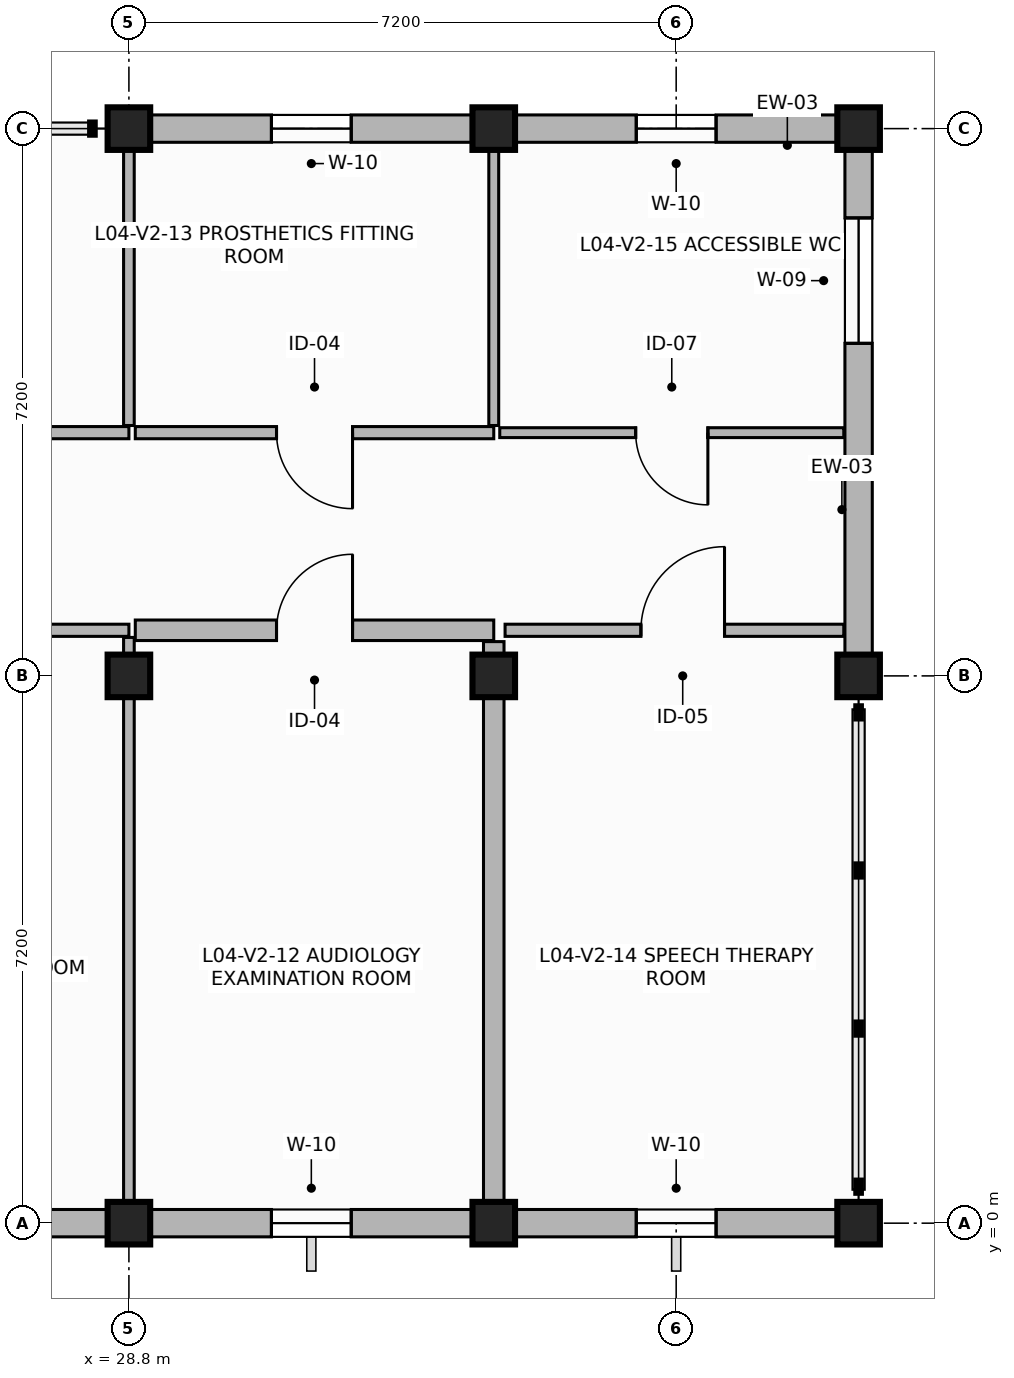
"""IFC4 building model, lengths in metres.
Left out: names, types, materials, properties, quantities, classifications, styles, units other than length and angle.
Written with IfcOpenShell. Run it as: python <this file> out.ifc"""

import sys

from ifc_helpers import new_model, si_unit, direction, frame, frame_2d, origin, origin_2d, place, context, subcontext, project, spatial, rectangle, extrude, element, fill, save


model = new_model("IFC4")
c1 = context("Model", 3, precision=1e-05, world=origin(), true_north=direction((0.0, 1.0)))
c2 = subcontext(c1, "Body", "Model", "MODEL_VIEW")
j1 = project(units=[si_unit("LENGTHUNIT", "METRE"), si_unit("PLANEANGLEUNIT", "RADIAN")], contexts=[c1])
p1 = place(None, origin())
s1 = spatial("IfcSite", under=j1, at=p1, CompositionType="ELEMENT")
p2 = place(p1, origin())
s2 = spatial("IfcBuilding", under=s1, at=p2, CompositionType="ELEMENT")
p3 = place(p2, frame((0.0, 0.0, 16.0)))
s3 = spatial("IfcBuildingStorey", under=s2, at=p3, CompositionType="ELEMENT", Elevation=16.0)
for number, where, z_axis, x_axis in (
    (1, (28.8, 0.0, 0.0), (0.0, 0.0, 1.0), (1.0, 0.0, 0.0)),
    (2, (28.8, 7.2, 0.0), (0.0, 0.0, 1.0), (1.0, 0.0, 0.0)),
    (3, (28.8, 14.4, 0.0), (0.0, 0.0, 1.0), (1.0, 0.0, 0.0)),
    (4, (33.6, 0.0, 0.0), (0.0, 0.0, 1.0), (1.0, 0.0, 0.0)),
    (5, (33.6, 7.2, 0.0), (0.0, 0.0, 1.0), (1.0, 0.0, 0.0)),
    (6, (33.6, 14.4, 0.0), (0.0, 0.0, 1.0), (1.0, 0.0, 0.0)),
    (7, (38.4, 0.0, 0.0), (0.0, 0.0, 1.0), (1.0, 0.0, 0.0)),
    (8, (38.4, 7.2, 0.0), (0.0, 0.0, 1.0), (1.0, 0.0, 0.0)),
    (9, (38.4, 14.4, 0.0), (0.0, 0.0, 1.0), (1.0, 0.0, 0.0)),
):
    element("IfcColumn", number, at=place(p3, frame(where, z_axis=z_axis, x_axis=x_axis)), inside=s3, PredefinedType="COLUMN", context=c2, shape_type="SweptSolid", body=[
        extrude(rectangle(XDim=0.56, YDim=0.56, at=origin_2d()), origin(), (0.0, 0.0, 1.0), 3.42),
    ])
p4 = place(p3, frame((21.6, 0.0, 0.0), z_axis=(0.0, 0.0, 1.0), x_axis=(1.0, 0.0, 0.0)))
e10 = element("IfcWall", 10, at=p4, inside=s3, PredefinedType="SOLIDWALL", context=c2, shape_type="SweptSolid", body=[
    extrude(rectangle(XDim=7.2, YDim=0.36, at=frame_2d((3.6, 0.0))), origin(), (0.0, 0.0, 1.0), 2.8),
])
p5 = place(p4, frame((2.875, 0.0, 0.85)))
e11 = element("IfcOpeningElement", 11, at=p5, cuts=e10, PredefinedType="OPENING", context=c2, shape_type="SweptSolid", body=[
    extrude(rectangle(XDim=1.45, YDim=1.75, at=frame_2d((0.725, 0.875))), frame((0.0, 0.19, 0.0), z_axis=(0.0, -1.0, 0.0), x_axis=(1.0, 0.0, 0.0)), (0.0, 0.0, 1.0), 0.38),
])
p6 = place(p3, frame((28.8, 0.0, 0.0), z_axis=(0.0, 0.0, 1.0), x_axis=(1.0, 0.0, 0.0)))
e12 = element("IfcWall", 12, at=p6, inside=s3, PredefinedType="SOLIDWALL", context=c2, shape_type="SweptSolid", body=[
    extrude(rectangle(XDim=4.8, YDim=0.36, at=frame_2d((2.4, 0.0))), origin(), (0.0, 0.0, 1.0), 2.8),
])
p7 = place(p6, frame((1.875, 0.0, 0.85)))
e13 = element("IfcOpeningElement", 13, at=p7, cuts=e12, PredefinedType="OPENING", context=c2, shape_type="SweptSolid", body=[
    extrude(rectangle(XDim=1.05, YDim=1.7, at=frame_2d((0.525, 0.85))), frame((0.0, 0.19, 0.0), z_axis=(0.0, -1.0, 0.0), x_axis=(1.0, 0.0, 0.0)), (0.0, 0.0, 1.0), 0.38),
])
p8 = place(p3, frame((33.6, 0.0, 0.0), z_axis=(0.0, 0.0, 1.0), x_axis=(1.0, 0.0, 0.0)))
e14 = element("IfcWall", 14, at=p8, inside=s3, PredefinedType="SOLIDWALL", context=c2, shape_type="SweptSolid", body=[
    extrude(rectangle(XDim=4.8, YDim=0.36, at=frame_2d((2.4, 0.0))), origin(), (0.0, 0.0, 1.0), 2.8),
])
p9 = place(p8, frame((1.875, 0.0, 0.85)))
e15 = element("IfcOpeningElement", 15, at=p9, cuts=e14, PredefinedType="OPENING", context=c2, shape_type="SweptSolid", body=[
    extrude(rectangle(XDim=1.05, YDim=1.7, at=frame_2d((0.525, 0.85))), frame((0.0, 0.19, 0.0), z_axis=(0.0, -1.0, 0.0), x_axis=(1.0, 0.0, 0.0)), (0.0, 0.0, 1.0), 0.38),
])
p10 = place(p3, frame((38.4, 7.2, 0.0), z_axis=(0.0, 0.0, 1.0), x_axis=(0.0, 1.0, 0.0)))
e16 = element("IfcWall", 16, at=p10, inside=s3, PredefinedType="SOLIDWALL", context=c2, shape_type="SweptSolid", body=[
    extrude(rectangle(XDim=7.2, YDim=0.36, at=frame_2d((3.6, 0.0))), origin(), (0.0, 0.0, 1.0), 2.8),
])
p11 = place(p10, frame((4.375, 0.0, 0.85)))
e17 = element("IfcOpeningElement", 17, at=p11, cuts=e16, PredefinedType="OPENING", context=c2, shape_type="SweptSolid", body=[
    extrude(rectangle(XDim=1.65, YDim=1.75, at=frame_2d((0.825, 0.875))), frame((0.0, 0.19, 0.0), z_axis=(0.0, -1.0, 0.0), x_axis=(1.0, 0.0, 0.0)), (0.0, 0.0, 1.0), 0.38),
])
p12 = place(p3, frame((38.4, 14.4, 0.0), z_axis=(0.0, 0.0, 1.0), x_axis=(-1.0, 0.0, 0.0)))
e18 = element("IfcWall", 18, at=p12, inside=s3, PredefinedType="SOLIDWALL", context=c2, shape_type="SweptSolid", body=[
    extrude(rectangle(XDim=4.8, YDim=0.36, at=frame_2d((2.4, 0.0))), origin(), (0.0, 0.0, 1.0), 2.8),
])
p13 = place(p12, frame((1.875, 0.0, 0.85)))
e19 = element("IfcOpeningElement", 19, at=p13, cuts=e18, PredefinedType="OPENING", context=c2, shape_type="SweptSolid", body=[
    extrude(rectangle(XDim=1.05, YDim=1.7, at=frame_2d((0.525, 0.85))), frame((0.0, 0.19, 0.0), z_axis=(0.0, -1.0, 0.0), x_axis=(1.0, 0.0, 0.0)), (0.0, 0.0, 1.0), 0.38),
])
p14 = place(p3, frame((33.6, 14.4, 0.0), z_axis=(0.0, 0.0, 1.0), x_axis=(-1.0, 0.0, 0.0)))
e20 = element("IfcWall", 20, at=p14, inside=s3, PredefinedType="SOLIDWALL", context=c2, shape_type="SweptSolid", body=[
    extrude(rectangle(XDim=4.8, YDim=0.36, at=frame_2d((2.4, 0.0))), origin(), (0.0, 0.0, 1.0), 2.8),
])
p15 = place(p14, frame((1.875, 0.0, 0.85)))
e21 = element("IfcOpeningElement", 21, at=p15, cuts=e20, PredefinedType="OPENING", context=c2, shape_type="SweptSolid", body=[
    extrude(rectangle(XDim=1.05, YDim=1.7, at=frame_2d((0.525, 0.85))), frame((0.0, 0.19, 0.0), z_axis=(0.0, -1.0, 0.0), x_axis=(1.0, 0.0, 0.0)), (0.0, 0.0, 1.0), 0.38),
])
p16 = place(p3, frame((21.684, 7.8, 0.0), z_axis=(0.0, 0.0, 1.0), x_axis=(1.0, 0.0, 0.0)))
e22 = element("IfcWall", 22, at=p16, inside=s3, PredefinedType="PARTITIONING", context=c2, shape_type="SweptSolid", body=[
    extrude(rectangle(XDim=7.116, YDim=0.16, at=frame_2d((3.558, 0.0))), origin(), (0.0, 0.0, 1.0), 2.78),
])
p17 = place(p16, frame((3.008, 0.0, 0.0)))
e23 = element("IfcOpeningElement", 23, at=p17, cuts=e22, PredefinedType="OPENING", context=c2, shape_type="SweptSolid", body=[
    extrude(rectangle(XDim=1.1, YDim=2.2, at=frame_2d((0.55, 1.1))), frame((0.0, 0.09, 0.0), z_axis=(0.0, -1.0, 0.0), x_axis=(1.0, 0.0, 0.0)), (0.0, 0.0, 1.0), 0.18),
])
p18 = place(p3, frame((28.8, 7.706, 0.0), z_axis=(0.0, 0.0, 1.0), x_axis=(0.0, -1.0, 0.0)))
e24 = element("IfcWall", 24, at=p18, inside=s3, PredefinedType="PARTITIONING", context=c2, shape_type="SweptSolid", body=[
    extrude(rectangle(XDim=7.511, YDim=0.14, at=frame_2d((3.755, 0.0))), origin(), (0.0, 0.0, 1.0), 2.78),
])
p19 = place(p3, frame((28.8, 10.4, 0.0), z_axis=(0.0, 0.0, 1.0), x_axis=(-1.0, 0.0, 0.0)))
e25 = element("IfcWall", 25, at=p19, inside=s3, PredefinedType="PARTITIONING", context=c2, shape_type="SweptSolid", body=[
    extrude(rectangle(XDim=7.116, YDim=0.16, at=frame_2d((3.558, 0.0))), origin(), (0.0, 0.0, 1.0), 2.78),
])
p20 = place(p19, frame((3.033, 0.0, 0.0)))
e26 = element("IfcOpeningElement", 26, at=p20, cuts=e25, PredefinedType="OPENING", context=c2, shape_type="SweptSolid", body=[
    extrude(rectangle(XDim=1.05, YDim=2.15, at=frame_2d((0.525, 1.075))), frame((0.0, 0.09, 0.0), z_axis=(0.0, -1.0, 0.0), x_axis=(1.0, 0.0, 0.0)), (0.0, 0.0, 1.0), 0.18),
])
p21 = place(p3, frame((28.8, 14.205, 0.0), z_axis=(0.0, 0.0, 1.0), x_axis=(0.0, -1.0, 0.0)))
e27 = element("IfcWall", 27, at=p21, inside=s3, PredefinedType="PARTITIONING", context=c2, shape_type="SweptSolid", body=[
    extrude(rectangle(XDim=3.711, YDim=0.14, at=frame_2d((1.855, 0.0))), origin(), (0.0, 0.0, 1.0), 2.78),
])
p22 = place(p3, frame((28.884, 7.8, 0.0), z_axis=(0.0, 0.0, 1.0), x_axis=(1.0, 0.0, 0.0)))
e28 = element("IfcWall", 28, at=p22, inside=s3, PredefinedType="PARTITIONING", context=c2, shape_type="SweptSolid", body=[
    extrude(rectangle(XDim=4.716, YDim=0.27, at=frame_2d((2.358, 0.0))), origin(), (0.0, 0.0, 1.0), 2.78),
])
p23 = place(p22, frame((1.858, 0.0, 0.0)))
e29 = element("IfcOpeningElement", 29, at=p23, cuts=e28, PredefinedType="OPENING", context=c2, shape_type="SweptSolid", body=[
    extrude(rectangle(XDim=1.0, YDim=2.15, at=frame_2d((0.5, 1.075))), frame((0.0, 0.145, 0.0), z_axis=(0.0, -1.0, 0.0), x_axis=(1.0, 0.0, 0.0)), (0.0, 0.0, 1.0), 0.29),
])
p24 = place(p3, frame((33.6, 7.651, 0.0), z_axis=(0.0, 0.0, 1.0), x_axis=(0.0, -1.0, 0.0)))
e30 = element("IfcWall", 30, at=p24, inside=s3, PredefinedType="PARTITIONING", context=c2, shape_type="SweptSolid", body=[
    extrude(rectangle(XDim=7.456, YDim=0.27, at=frame_2d((3.728, 0.0))), origin(), (0.0, 0.0, 1.0), 2.78),
])
p25 = place(p3, frame((33.6, 10.4, 0.0), z_axis=(0.0, 0.0, 1.0), x_axis=(-1.0, 0.0, 0.0)))
e31 = element("IfcWall", 31, at=p25, inside=s3, PredefinedType="PARTITIONING", context=c2, shape_type="SweptSolid", body=[
    extrude(rectangle(XDim=4.716, YDim=0.16, at=frame_2d((2.358, 0.0))), origin(), (0.0, 0.0, 1.0), 2.78),
])
p26 = place(p25, frame((1.858, 0.0, 0.0)))
e32 = element("IfcOpeningElement", 32, at=p26, cuts=e31, PredefinedType="OPENING", context=c2, shape_type="SweptSolid", body=[
    extrude(rectangle(XDim=1.0, YDim=2.15, at=frame_2d((0.5, 1.075))), frame((0.0, 0.09, 0.0), z_axis=(0.0, -1.0, 0.0), x_axis=(1.0, 0.0, 0.0)), (0.0, 0.0, 1.0), 0.18),
])
p27 = place(p3, frame((33.6, 14.205, 0.0), z_axis=(0.0, 0.0, 1.0), x_axis=(0.0, -1.0, 0.0)))
e33 = element("IfcWall", 33, at=p27, inside=s3, PredefinedType="PARTITIONING", context=c2, shape_type="SweptSolid", body=[
    extrude(rectangle(XDim=3.711, YDim=0.13, at=frame_2d((1.855, 0.0))), origin(), (0.0, 0.0, 1.0), 2.78),
])
p28 = place(p3, frame((33.749, 7.8, 0.0), z_axis=(0.0, 0.0, 1.0), x_axis=(1.0, 0.0, 0.0)))
e34 = element("IfcWall", 34, at=p28, inside=s3, PredefinedType="PARTITIONING", context=c2, shape_type="SweptSolid", body=[
    extrude(rectangle(XDim=4.456, YDim=0.16, at=frame_2d((2.228, 0.0))), origin(), (0.0, 0.0, 1.0), 2.78),
])
p29 = place(p28, frame((1.787, 0.0, 0.0)))
e35 = element("IfcOpeningElement", 35, at=p29, cuts=e34, PredefinedType="OPENING", context=c2, shape_type="SweptSolid", body=[
    extrude(rectangle(XDim=1.1, YDim=2.2, at=frame_2d((0.55, 1.1))), frame((0.0, 0.09, 0.0), z_axis=(0.0, -1.0, 0.0), x_axis=(1.0, 0.0, 0.0)), (0.0, 0.0, 1.0), 0.18),
])
p30 = place(p3, frame((38.205, 10.4, 0.0), z_axis=(0.0, 0.0, 1.0), x_axis=(-1.0, 0.0, 0.0)))
e36 = element("IfcWall", 36, at=p30, inside=s3, PredefinedType="PARTITIONING", context=c2, shape_type="SweptSolid", body=[
    extrude(rectangle(XDim=4.526, YDim=0.13, at=frame_2d((2.263, 0.0))), origin(), (0.0, 0.0, 1.0), 2.78),
])
p31 = place(p30, frame((1.788, 0.0, 0.0)))
e37 = element("IfcOpeningElement", 37, at=p31, cuts=e36, PredefinedType="OPENING", context=c2, shape_type="SweptSolid", body=[
    extrude(rectangle(XDim=0.95, YDim=2.1, at=frame_2d((0.475, 1.05))), frame((0.0, 0.075, 0.0), z_axis=(0.0, -1.0, 0.0), x_axis=(1.0, 0.0, 0.0)), (0.0, 0.0, 1.0), 0.15),
])
p32 = place(p7, origin())
e38 = element("IfcWindow", 38, at=p32, inside=s3, PartitioningType="SINGLE_PANEL", PredefinedType="WINDOW", context=c2, shape_type="SweptSolid", body=[
    extrude(rectangle(XDim=1.05, YDim=1.7, at=frame_2d((0.525, 0.85))), frame((0.0, 0.03, 0.0), z_axis=(0.0, -1.0, 0.0), x_axis=(1.0, 0.0, 0.0)), (0.0, 0.0, 1.0), 0.06),
])
fill(e13, e38)
p33 = place(p9, origin())
e39 = element("IfcWindow", 39, at=p33, inside=s3, PartitioningType="SINGLE_PANEL", PredefinedType="WINDOW", context=c2, shape_type="SweptSolid", body=[
    extrude(rectangle(XDim=1.05, YDim=1.7, at=frame_2d((0.525, 0.85))), frame((0.0, 0.03, 0.0), z_axis=(0.0, -1.0, 0.0), x_axis=(1.0, 0.0, 0.0)), (0.0, 0.0, 1.0), 0.06),
])
fill(e15, e39)
p34 = place(p11, origin())
e40 = element("IfcWindow", 40, at=p34, inside=s3, PartitioningType="SINGLE_PANEL", PredefinedType="WINDOW", context=c2, shape_type="SweptSolid", body=[
    extrude(rectangle(XDim=1.65, YDim=1.75, at=frame_2d((0.825, 0.875))), frame((0.0, 0.03, 0.0), z_axis=(0.0, -1.0, 0.0), x_axis=(1.0, 0.0, 0.0)), (0.0, 0.0, 1.0), 0.06),
])
fill(e17, e40)
p35 = place(p13, origin())
e41 = element("IfcWindow", 41, at=p35, inside=s3, PartitioningType="SINGLE_PANEL", PredefinedType="WINDOW", context=c2, shape_type="SweptSolid", body=[
    extrude(rectangle(XDim=1.05, YDim=1.7, at=frame_2d((0.525, 0.85))), frame((0.0, 0.03, 0.0), z_axis=(0.0, -1.0, 0.0), x_axis=(1.0, 0.0, 0.0)), (0.0, 0.0, 1.0), 0.06),
])
fill(e19, e41)
p36 = place(p15, origin())
e42 = element("IfcWindow", 42, at=p36, inside=s3, PartitioningType="SINGLE_PANEL", PredefinedType="WINDOW", context=c2, shape_type="SweptSolid", body=[
    extrude(rectangle(XDim=1.05, YDim=1.7, at=frame_2d((0.525, 0.85))), frame((0.0, 0.03, 0.0), z_axis=(0.0, -1.0, 0.0), x_axis=(1.0, 0.0, 0.0)), (0.0, 0.0, 1.0), 0.06),
])
fill(e21, e42)
p37 = place(p23, origin())
e43 = element("IfcDoor", 43, at=p37, inside=s3, OperationType="SINGLE_SWING_RIGHT", PredefinedType="DOOR", context=c2, shape_type="SweptSolid", body=[
    extrude(rectangle(XDim=1.0, YDim=2.15, at=frame_2d((0.5, 1.075))), frame((0.0, 0.025, 0.0), z_axis=(0.0, -1.0, 0.0), x_axis=(1.0, 0.0, 0.0)), (0.0, 0.0, 1.0), 0.05),
])
fill(e29, e43)
p38 = place(p26, origin())
e44 = element("IfcDoor", 44, at=p38, inside=s3, OperationType="SINGLE_SWING_LEFT", PredefinedType="DOOR", context=c2, shape_type="SweptSolid", body=[
    extrude(rectangle(XDim=1.0, YDim=2.15, at=frame_2d((0.5, 1.075))), frame((0.0, 0.025, 0.0), z_axis=(0.0, -1.0, 0.0), x_axis=(1.0, 0.0, 0.0)), (0.0, 0.0, 1.0), 0.05),
])
fill(e32, e44)
p39 = place(p29, origin())
e45 = element("IfcDoor", 45, at=p39, inside=s3, OperationType="SINGLE_SWING_RIGHT", PredefinedType="DOOR", context=c2, shape_type="SweptSolid", body=[
    extrude(rectangle(XDim=1.1, YDim=2.2, at=frame_2d((0.55, 1.1))), frame((0.0, 0.025, 0.0), z_axis=(0.0, -1.0, 0.0), x_axis=(1.0, 0.0, 0.0)), (0.0, 0.0, 1.0), 0.05),
])
fill(e35, e45)
p40 = place(p31, origin())
e46 = element("IfcDoor", 46, at=p40, inside=s3, OperationType="SINGLE_SWING_LEFT", PredefinedType="DOOR", context=c2, shape_type="SweptSolid", body=[
    extrude(rectangle(XDim=0.95, YDim=2.1, at=frame_2d((0.475, 1.05))), frame((0.0, 0.025, 0.0), z_axis=(0.0, -1.0, 0.0), x_axis=(1.0, 0.0, 0.0)), (0.0, 0.0, 1.0), 0.05),
])
fill(e37, e46)
save(model, sys.argv[1])
